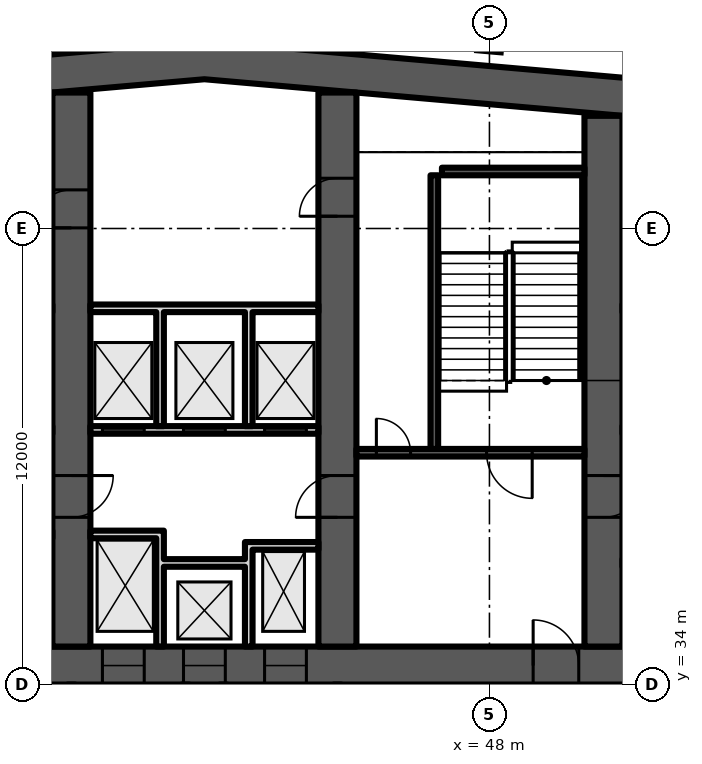
"""IFC4 building model, lengths in metres.
Left out: names, types, materials, properties, quantities, classifications, styles, units other than length and angle.
Written with IfcOpenShell. Run it as: python <this file> out.ifc"""

import sys

from ifc_helpers import new_model, si_unit, direction, frame, frame_2d, origin, origin_2d, place, context, subcontext, project, spatial, polyline, rectangle, i_section, outline, extrude, element, fill, save


model = new_model("IFC4")
c1 = context("Model", 3, precision=1e-05, world=origin(), true_north=direction((0.0, 1.0)))
c2 = subcontext(c1, "Body", "Model", "MODEL_VIEW")
j1 = project(units=[si_unit("LENGTHUNIT", "METRE"), si_unit("PLANEANGLEUNIT", "RADIAN")], contexts=[c1])
p1 = place(None, origin())
s1 = spatial("IfcSite", under=j1, at=p1, CompositionType="ELEMENT")
p2 = place(p1, origin())
s2 = spatial("IfcBuilding", under=s1, at=p2, CompositionType="ELEMENT")
p3 = place(p2, frame((0.0, 0.0, 147.1)))
s3 = spatial("IfcBuildingStorey", under=s2, at=p3, CompositionType="ELEMENT", Elevation=147.1)
p4 = place(p3, frame((0.0, 0.0, -0.0)))
e1 = element("IfcWall", 1, at=p4, inside=s3, PredefinedType="SHEAR", context=c2, shape_type="SweptSolid", body=[
    extrude(outline(polyline([(16.0, 47.784), (40.5, 49.927), (65.0, 47.784), (65.0, 48.787), (40.5, 50.931), (16.0, 48.787), (16.0, 47.784)])), origin(), (0.0, 0.0, 1.0), 4.8),
])
p5 = place(p3, frame((16.0, 34.5, 0.0), z_axis=(0.0, 0.0, 1.0), x_axis=(1.0, 0.0, 0.0)))
e2 = element("IfcWall", 2, at=p5, inside=s3, PredefinedType="SHEAR", context=c2, shape_type="SweptSolid", body=[
    extrude(rectangle(XDim=49.0, YDim=1.0, at=frame_2d((24.5, 0.0))), origin(), (0.0, 0.0, 1.0), 4.8),
])
p6 = place(p5, frame((1.2, 0.0, 0.0)))
e3 = element("IfcOpeningElement", 3, at=p6, cuts=e2, PredefinedType="OPENING", context=c2, shape_type="SweptSolid", body=[
    extrude(rectangle(XDim=1.1, YDim=2.1, at=frame_2d((0.55, 1.05))), frame((0.0, 0.51, 0.0), z_axis=(0.0, -1.0, 0.0), x_axis=(1.0, 0.0, 0.0)), (0.0, 0.0, 1.0), 1.02),
])
p7 = place(p5, frame((5.083, 0.0, 0.0)))
e4 = element("IfcOpeningElement", 4, at=p7, cuts=e2, PredefinedType="OPENING", context=c2, shape_type="SweptSolid", body=[
    extrude(rectangle(XDim=1.1, YDim=2.1, at=frame_2d((0.55, 1.05))), frame((0.0, 0.51, 0.0), z_axis=(0.0, -1.0, 0.0), x_axis=(1.0, 0.0, 0.0)), (0.0, 0.0, 1.0), 1.02),
])
p8 = place(p5, frame((2.933, 0.0, 0.0)))
e5 = element("IfcOpeningElement", 5, at=p8, cuts=e2, PredefinedType="OPENING", context=c2, shape_type="SweptSolid", body=[
    extrude(rectangle(XDim=1.4, YDim=2.1, at=frame_2d((0.7, 1.05))), frame((0.0, 0.51, 0.0), z_axis=(0.0, -1.0, 0.0), x_axis=(1.0, 0.0, 0.0)), (0.0, 0.0, 1.0), 1.02),
])
p9 = place(p5, frame((7.65, 0.0, 0.0)))
e6 = element("IfcOpeningElement", 6, at=p9, cuts=e2, PredefinedType="OPENING", context=c2, shape_type="SweptSolid", body=[
    extrude(rectangle(XDim=1.2, YDim=2.1, at=frame_2d((0.6, 1.05))), frame((0.0, 0.51, 0.0), z_axis=(0.0, -1.0, 0.0), x_axis=(1.0, 0.0, 0.0)), (0.0, 0.0, 1.0), 1.02),
])
p10 = place(p5, frame((14.817, 0.0, 0.0)))
e7 = element("IfcOpeningElement", 7, at=p10, cuts=e2, PredefinedType="OPENING", context=c2, shape_type="SweptSolid", body=[
    extrude(rectangle(XDim=1.1, YDim=2.1, at=frame_2d((0.55, 1.05))), frame((0.0, 0.51, 0.0), z_axis=(0.0, -1.0, 0.0), x_axis=(1.0, 0.0, 0.0)), (0.0, 0.0, 1.0), 1.02),
])
p11 = place(p5, frame((19.083, 0.0, 0.0)))
e8 = element("IfcOpeningElement", 8, at=p11, cuts=e2, PredefinedType="OPENING", context=c2, shape_type="SweptSolid", body=[
    extrude(rectangle(XDim=1.1, YDim=2.1, at=frame_2d((0.55, 1.05))), frame((0.0, 0.51, 0.0), z_axis=(0.0, -1.0, 0.0), x_axis=(1.0, 0.0, 0.0)), (0.0, 0.0, 1.0), 1.02),
])
p12 = place(p5, frame((16.8, 0.0, 0.0)))
e9 = element("IfcOpeningElement", 9, at=p12, cuts=e2, PredefinedType="OPENING", context=c2, shape_type="SweptSolid", body=[
    extrude(rectangle(XDim=1.4, YDim=2.1, at=frame_2d((0.7, 1.05))), frame((0.0, 0.51, 0.0), z_axis=(0.0, -1.0, 0.0), x_axis=(1.0, 0.0, 0.0)), (0.0, 0.0, 1.0), 1.02),
])
p13 = place(p5, frame((21.817, 0.0, 0.0)))
e10 = element("IfcOpeningElement", 10, at=p13, cuts=e2, PredefinedType="OPENING", context=c2, shape_type="SweptSolid", body=[
    extrude(rectangle(XDim=1.1, YDim=2.1, at=frame_2d((0.55, 1.05))), frame((0.0, 0.51, 0.0), z_axis=(0.0, -1.0, 0.0), x_axis=(1.0, 0.0, 0.0)), (0.0, 0.0, 1.0), 1.02),
])
p14 = place(p5, frame((23.95, 0.0, 0.0)))
e11 = element("IfcOpeningElement", 11, at=p14, cuts=e2, PredefinedType="OPENING", context=c2, shape_type="SweptSolid", body=[
    extrude(rectangle(XDim=1.1, YDim=2.1, at=frame_2d((0.55, 1.05))), frame((0.0, 0.51, 0.0), z_axis=(0.0, -1.0, 0.0), x_axis=(1.0, 0.0, 0.0)), (0.0, 0.0, 1.0), 1.02),
])
p15 = place(p5, frame((26.083, 0.0, 0.0)))
e12 = element("IfcOpeningElement", 12, at=p15, cuts=e2, PredefinedType="OPENING", context=c2, shape_type="SweptSolid", body=[
    extrude(rectangle(XDim=1.1, YDim=2.1, at=frame_2d((0.55, 1.05))), frame((0.0, 0.51, 0.0), z_axis=(0.0, -1.0, 0.0), x_axis=(1.0, 0.0, 0.0)), (0.0, 0.0, 1.0), 1.02),
])
p16 = place(p5, frame((33.15, 0.0, 0.0)))
e13 = element("IfcOpeningElement", 13, at=p16, cuts=e2, PredefinedType="OPENING", context=c2, shape_type="SweptSolid", body=[
    extrude(rectangle(XDim=1.2, YDim=2.1, at=frame_2d((0.6, 1.05))), frame((0.0, 0.51, 0.0), z_axis=(0.0, -1.0, 0.0), x_axis=(1.0, 0.0, 0.0)), (0.0, 0.0, 1.0), 1.02),
])
p17 = place(p5, frame((35.817, 0.0, 0.0)))
e14 = element("IfcOpeningElement", 14, at=p17, cuts=e2, PredefinedType="OPENING", context=c2, shape_type="SweptSolid", body=[
    extrude(rectangle(XDim=1.1, YDim=2.1, at=frame_2d((0.55, 1.05))), frame((0.0, 0.51, 0.0), z_axis=(0.0, -1.0, 0.0), x_axis=(1.0, 0.0, 0.0)), (0.0, 0.0, 1.0), 1.02),
])
p18 = place(p5, frame((40.083, 0.0, 0.0)))
e15 = element("IfcOpeningElement", 15, at=p18, cuts=e2, PredefinedType="OPENING", context=c2, shape_type="SweptSolid", body=[
    extrude(rectangle(XDim=1.1, YDim=2.1, at=frame_2d((0.55, 1.05))), frame((0.0, 0.51, 0.0), z_axis=(0.0, -1.0, 0.0), x_axis=(1.0, 0.0, 0.0)), (0.0, 0.0, 1.0), 1.02),
])
p19 = place(p5, frame((37.8, 0.0, 0.0)))
e16 = element("IfcOpeningElement", 16, at=p19, cuts=e2, PredefinedType="OPENING", context=c2, shape_type="SweptSolid", body=[
    extrude(rectangle(XDim=1.4, YDim=2.1, at=frame_2d((0.7, 1.05))), frame((0.0, 0.51, 0.0), z_axis=(0.0, -1.0, 0.0), x_axis=(1.0, 0.0, 0.0)), (0.0, 0.0, 1.0), 1.02),
])
p20 = place(p5, frame((42.817, 0.0, 0.0)))
e17 = element("IfcOpeningElement", 17, at=p20, cuts=e2, PredefinedType="OPENING", context=c2, shape_type="SweptSolid", body=[
    extrude(rectangle(XDim=1.1, YDim=2.1, at=frame_2d((0.55, 1.05))), frame((0.0, 0.51, 0.0), z_axis=(0.0, -1.0, 0.0), x_axis=(1.0, 0.0, 0.0)), (0.0, 0.0, 1.0), 1.02),
])
p21 = place(p5, frame((46.7, 0.0, 0.0)))
e18 = element("IfcOpeningElement", 18, at=p21, cuts=e2, PredefinedType="OPENING", context=c2, shape_type="SweptSolid", body=[
    extrude(rectangle(XDim=1.1, YDim=2.1, at=frame_2d((0.55, 1.05))), frame((0.0, 0.51, 0.0), z_axis=(0.0, -1.0, 0.0), x_axis=(1.0, 0.0, 0.0)), (0.0, 0.0, 1.0), 1.02),
])
p22 = place(p5, frame((44.667, 0.0, 0.0)))
e19 = element("IfcOpeningElement", 19, at=p22, cuts=e2, PredefinedType="OPENING", context=c2, shape_type="SweptSolid", body=[
    extrude(rectangle(XDim=1.4, YDim=2.1, at=frame_2d((0.7, 1.05))), frame((0.0, 0.51, 0.0), z_axis=(0.0, -1.0, 0.0), x_axis=(1.0, 0.0, 0.0)), (0.0, 0.0, 1.0), 1.02),
])
p23 = place(p3, frame((37.0, 35.0, 0.0), z_axis=(0.0, 0.0, 1.0), x_axis=(0.0, 1.0, 0.0)))
e20 = element("IfcWall", 20, at=p23, inside=s3, PredefinedType="SHEAR", context=c2, shape_type="SweptSolid", body=[
    extrude(rectangle(XDim=14.577, YDim=1.0, at=frame_2d((7.289, 0.0))), origin(), (0.0, 0.0, 1.0), 4.8),
])
p24 = place(p23, frame((11.016, 0.0, 0.0)))
e21 = element("IfcOpeningElement", 21, at=p24, cuts=e20, PredefinedType="OPENING", context=c2, shape_type="SweptSolid", body=[
    extrude(rectangle(XDim=1.0, YDim=2.1, at=frame_2d((0.5, 1.05))), frame((0.0, 0.51, 0.0), z_axis=(0.0, -1.0, 0.0), x_axis=(1.0, 0.0, 0.0)), (0.0, 0.0, 1.0), 1.02),
])
p25 = place(p23, frame((3.4, 0.0, 0.0)))
e22 = element("IfcOpeningElement", 22, at=p25, cuts=e20, PredefinedType="OPENING", context=c2, shape_type="SweptSolid", body=[
    extrude(rectangle(XDim=1.1, YDim=2.1, at=frame_2d((0.55, 1.05))), frame((0.0, 0.51, 0.0), z_axis=(0.0, -1.0, 0.0), x_axis=(1.0, 0.0, 0.0)), (0.0, 0.0, 1.0), 1.02),
])
p26 = place(p3, frame((44.0, 35.0, 0.0), z_axis=(0.0, 0.0, 1.0), x_axis=(0.0, 1.0, 0.0)))
e23 = element("IfcWall", 23, at=p26, inside=s3, PredefinedType="SHEAR", context=c2, shape_type="SweptSolid", body=[
    extrude(rectangle(XDim=14.577, YDim=1.0, at=frame_2d((7.289, 0.0))), origin(), (0.0, 0.0, 1.0), 4.8),
])
p27 = place(p26, frame((11.322, 0.0, 0.0)))
e24 = element("IfcOpeningElement", 24, at=p27, cuts=e23, PredefinedType="OPENING", context=c2, shape_type="SweptSolid", body=[
    extrude(rectangle(XDim=1.0, YDim=2.1, at=frame_2d((0.5, 1.05))), frame((0.0, 0.51, 0.0), z_axis=(0.0, -1.0, 0.0), x_axis=(1.0, 0.0, 0.0)), (0.0, 0.0, 1.0), 1.02),
])
p28 = place(p26, frame((3.4, 0.0, 0.0)))
e25 = element("IfcOpeningElement", 25, at=p28, cuts=e23, PredefinedType="OPENING", context=c2, shape_type="SweptSolid", body=[
    extrude(rectangle(XDim=1.1, YDim=2.1, at=frame_2d((0.55, 1.05))), frame((0.0, 0.51, 0.0), z_axis=(0.0, -1.0, 0.0), x_axis=(1.0, 0.0, 0.0)), (0.0, 0.0, 1.0), 1.02),
])
p29 = place(p3, frame((51.0, 35.0, 0.0), z_axis=(0.0, 0.0, 1.0), x_axis=(0.0, 1.0, 0.0)))
e26 = element("IfcWall", 26, at=p29, inside=s3, PredefinedType="SHEAR", context=c2, shape_type="SweptSolid", body=[
    extrude(rectangle(XDim=13.965, YDim=1.0, at=frame_2d((6.982, 0.0))), origin(), (0.0, 0.0, 1.0), 4.8),
])
p30 = place(p29, frame((3.4, 0.0, 0.0)))
e27 = element("IfcOpeningElement", 27, at=p30, cuts=e26, PredefinedType="OPENING", context=c2, shape_type="SweptSolid", body=[
    extrude(rectangle(XDim=1.1, YDim=2.1, at=frame_2d((0.55, 1.05))), frame((0.0, 0.51, 0.0), z_axis=(0.0, -1.0, 0.0), x_axis=(1.0, 0.0, 0.0)), (0.0, 0.0, 1.0), 1.02),
])
p31 = place(p3, frame((48.0, 50.815, 0.0), z_axis=(0.0, 0.0, 1.0), x_axis=(0.087156, 0.996198, 0.0)))
e28 = element("IfcColumn", 28, at=p31, inside=s3, PredefinedType="COLUMN", context=c2, shape_type="SweptSolid", body=[
    extrude(i_section(OverallWidth=0.305, OverallDepth=0.62, WebThickness=0.021, FlangeThickness=0.04, FilletRadius=0.027, at=origin_2d()), origin(), (0.0, 0.0, 1.0), 4.8),
])
p32 = place(p3, frame((37.5, 40.7, 0.0), z_axis=(0.0, 0.0, 1.0), x_axis=(1.0, 0.0, 0.0)))
e29 = element("IfcWall", 29, at=p32, inside=s3, PredefinedType="PARTITIONING", context=c2, shape_type="SweptSolid", body=[
    extrude(rectangle(XDim=6.0, YDim=0.2, at=frame_2d((3.0, 0.0))), origin(), (0.0, 0.0, 1.0), 4.4),
])
p33 = place(p32, frame((0.317, 0.0, 0.0)))
e30 = element("IfcOpeningElement", 30, at=p33, cuts=e29, PredefinedType="OPENING", context=c2, shape_type="SweptSolid", body=[
    extrude(rectangle(XDim=1.1, YDim=2.1, at=frame_2d((0.55, 1.05))), frame((0.0, 0.11, 0.0), z_axis=(0.0, -1.0, 0.0), x_axis=(1.0, 0.0, 0.0)), (0.0, 0.0, 1.0), 0.22),
])
p34 = place(p32, frame((2.45, 0.0, 0.0)))
e31 = element("IfcOpeningElement", 31, at=p34, cuts=e29, PredefinedType="OPENING", context=c2, shape_type="SweptSolid", body=[
    extrude(rectangle(XDim=1.1, YDim=2.1, at=frame_2d((0.55, 1.05))), frame((0.0, 0.11, 0.0), z_axis=(0.0, -1.0, 0.0), x_axis=(1.0, 0.0, 0.0)), (0.0, 0.0, 1.0), 0.22),
])
p35 = place(p32, frame((4.583, 0.0, 0.0)))
e32 = element("IfcOpeningElement", 32, at=p35, cuts=e29, PredefinedType="OPENING", context=c2, shape_type="SweptSolid", body=[
    extrude(rectangle(XDim=1.1, YDim=2.1, at=frame_2d((0.55, 1.05))), frame((0.0, 0.11, 0.0), z_axis=(0.0, -1.0, 0.0), x_axis=(1.0, 0.0, 0.0)), (0.0, 0.0, 1.0), 0.22),
])
p36 = place(p3, frame((0.0, 0.0, -0.0)))
e33 = element("IfcWall", 33, at=p36, inside=s3, PredefinedType="PARTITIONING", context=c2, shape_type="SweptSolid", body=[
    extrude(outline(polyline([(41.567, 37.1), (39.433, 37.1), (39.433, 35.0), (39.233, 35.0), (39.233, 37.85), (37.5, 37.85), (37.5, 38.05), (39.233, 38.05), (39.433, 38.05), (39.433, 37.3), (41.567, 37.3), (41.567, 37.75), (41.767, 37.75), (43.5, 37.75), (43.5, 37.55), (41.767, 37.55), (41.767, 35.0), (41.567, 35.0), (41.567, 37.1)])), origin(), (0.0, 0.0, 1.0), 4.4),
])
p37 = place(p3, frame((0.0, 0.0, -0.0)))
e34 = element("IfcWall", 34, at=p37, inside=s3, PredefinedType="PARTITIONING", context=c2, shape_type="SweptSolid", body=[
    extrude(outline(polyline([(39.433, 40.8), (39.233, 40.8), (39.233, 43.8), (37.5, 43.8), (37.5, 44.0), (43.5, 44.0), (43.5, 43.8), (41.767, 43.8), (41.767, 40.8), (41.567, 40.8), (41.567, 43.8), (39.433, 43.8), (39.433, 40.8)])), origin(), (0.0, 0.0, 1.0), 4.4),
])
p38 = place(p3, frame((44.5, 40.1, 0.0), z_axis=(0.0, 0.0, 1.0), x_axis=(1.0, 0.0, 0.0)))
e35 = element("IfcWall", 35, at=p38, inside=s3, PredefinedType="SHEAR", context=c2, shape_type="SweptSolid", body=[
    extrude(rectangle(XDim=6.0, YDim=0.2, at=frame_2d((3.0, 0.0))), origin(), (0.0, 0.0, 1.0), 4.4),
])
p39 = place(p38, frame((3.425, 0.0, 0.0)))
e36 = element("IfcOpeningElement", 36, at=p39, cuts=e35, PredefinedType="OPENING", context=c2, shape_type="SweptSolid", body=[
    extrude(rectangle(XDim=1.2, YDim=2.1, at=frame_2d((0.6, 1.05))), frame((0.0, 0.11, 0.0), z_axis=(0.0, -1.0, 0.0), x_axis=(1.0, 0.0, 0.0)), (0.0, 0.0, 1.0), 0.22),
])
p40 = place(p38, frame((0.525, 0.0, 0.0)))
e37 = element("IfcOpeningElement", 37, at=p40, cuts=e35, PredefinedType="OPENING", context=c2, shape_type="SweptSolid", body=[
    extrude(rectangle(XDim=0.9, YDim=2.1, at=frame_2d((0.45, 1.05))), frame((0.0, 0.11, 0.0), z_axis=(0.0, -1.0, 0.0), x_axis=(1.0, 0.0, 0.0)), (0.0, 0.0, 1.0), 0.22),
])
p41 = place(p3, frame((46.55, 40.2, 0.0), z_axis=(0.0, 0.0, 1.0), x_axis=(0.0, 1.0, 0.0)))
e38 = element("IfcWall", 38, at=p41, inside=s3, PredefinedType="SHEAR", context=c2, shape_type="SweptSolid", body=[
    extrude(rectangle(XDim=7.2, YDim=0.2, at=frame_2d((3.6, 0.0))), origin(), (0.0, 0.0, 1.0), 4.4),
])
p42 = place(p3, frame((46.75, 47.5, 0.0), z_axis=(0.0, 0.0, 1.0), x_axis=(1.0, 0.0, 0.0)))
e39 = element("IfcWall", 39, at=p42, inside=s3, PredefinedType="SHEAR", context=c2, shape_type="SweptSolid", body=[
    extrude(rectangle(XDim=3.75, YDim=0.2, at=frame_2d((1.875, 0.0))), origin(), (0.0, 0.0, 1.0), 4.4),
])
p43 = place(p24, origin())
e40 = element("IfcDoor", 40, at=p43, inside=s3, OperationType="SINGLE_SWING_LEFT", PredefinedType="DOOR", context=c2, shape_type="SweptSolid", body=[
    extrude(rectangle(XDim=1.0, YDim=2.1, at=frame_2d((0.5, 1.05))), frame((0.0, 0.5, 0.0), z_axis=(0.0, -1.0, 0.0), x_axis=(1.0, 0.0, 0.0)), (0.0, 0.0, 1.0), 1.0),
])
fill(e21, e40)
p44 = place(p13, origin())
e41 = element("IfcDoor", 41, at=p44, inside=s3, OperationType="DOUBLE_DOOR_SLIDING", PredefinedType="DOOR", context=c2, shape_type="SweptSolid", body=[
    extrude(rectangle(XDim=1.1, YDim=2.1, at=frame_2d((0.55, 1.05))), frame((0.0, 0.025, 0.0), z_axis=(0.0, -1.0, 0.0), x_axis=(1.0, 0.0, 0.0)), (0.0, 0.0, 1.0), 0.05),
])
fill(e10, e41)
p45 = place(p14, origin())
e42 = element("IfcDoor", 42, at=p45, inside=s3, OperationType="DOUBLE_DOOR_SLIDING", PredefinedType="DOOR", context=c2, shape_type="SweptSolid", body=[
    extrude(rectangle(XDim=1.1, YDim=2.1, at=frame_2d((0.55, 1.05))), frame((0.0, 0.025, 0.0), z_axis=(0.0, -1.0, 0.0), x_axis=(1.0, 0.0, 0.0)), (0.0, 0.0, 1.0), 0.05),
])
fill(e11, e42)
p46 = place(p15, origin())
e43 = element("IfcDoor", 43, at=p46, inside=s3, OperationType="DOUBLE_DOOR_SLIDING", PredefinedType="DOOR", context=c2, shape_type="SweptSolid", body=[
    extrude(rectangle(XDim=1.1, YDim=2.1, at=frame_2d((0.55, 1.05))), frame((0.0, 0.025, 0.0), z_axis=(0.0, -1.0, 0.0), x_axis=(1.0, 0.0, 0.0)), (0.0, 0.0, 1.0), 0.05),
])
fill(e12, e43)
p47 = place(p33, origin())
e44 = element("IfcDoor", 44, at=p47, inside=s3, OperationType="DOUBLE_DOOR_SLIDING", PredefinedType="DOOR", context=c2, shape_type="SweptSolid", body=[
    extrude(rectangle(XDim=1.1, YDim=2.1, at=frame_2d((0.55, 1.05))), frame((0.0, 0.025, 0.0), z_axis=(0.0, -1.0, 0.0), x_axis=(1.0, 0.0, 0.0)), (0.0, 0.0, 1.0), 0.05),
])
fill(e30, e44)
p48 = place(p34, origin())
e45 = element("IfcDoor", 45, at=p48, inside=s3, OperationType="DOUBLE_DOOR_SLIDING", PredefinedType="DOOR", context=c2, shape_type="SweptSolid", body=[
    extrude(rectangle(XDim=1.1, YDim=2.1, at=frame_2d((0.55, 1.05))), frame((0.0, 0.025, 0.0), z_axis=(0.0, -1.0, 0.0), x_axis=(1.0, 0.0, 0.0)), (0.0, 0.0, 1.0), 0.05),
])
fill(e31, e45)
p49 = place(p35, origin())
e46 = element("IfcDoor", 46, at=p49, inside=s3, OperationType="DOUBLE_DOOR_SLIDING", PredefinedType="DOOR", context=c2, shape_type="SweptSolid", body=[
    extrude(rectangle(XDim=1.1, YDim=2.1, at=frame_2d((0.55, 1.05))), frame((0.0, 0.025, 0.0), z_axis=(0.0, -1.0, 0.0), x_axis=(1.0, 0.0, 0.0)), (0.0, 0.0, 1.0), 0.05),
])
fill(e32, e46)
p50 = place(p27, origin())
e47 = element("IfcDoor", 47, at=p50, inside=s3, OperationType="SINGLE_SWING_LEFT", PredefinedType="DOOR", context=c2, shape_type="SweptSolid", body=[
    extrude(rectangle(XDim=1.0, YDim=2.1, at=frame_2d((0.5, 1.05))), frame((0.0, 0.5, 0.0), z_axis=(0.0, -1.0, 0.0), x_axis=(1.0, 0.0, 0.0)), (0.0, 0.0, 1.0), 1.0),
])
fill(e24, e47)
p51 = place(p39, origin())
e48 = element("IfcDoor", 48, at=p51, inside=s3, OperationType="SINGLE_SWING_RIGHT", PredefinedType="DOOR", context=c2, shape_type="SweptSolid", body=[
    extrude(rectangle(XDim=1.2, YDim=2.1, at=frame_2d((0.6, 1.05))), frame((0.0, 0.025, 0.0), z_axis=(0.0, -1.0, 0.0), x_axis=(1.0, 0.0, 0.0)), (0.0, 0.0, 1.0), 0.05),
])
fill(e36, e48)
p52 = place(p40, origin())
e49 = element("IfcDoor", 49, at=p52, inside=s3, OperationType="SINGLE_SWING_LEFT", PredefinedType="DOOR", context=c2, shape_type="SweptSolid", body=[
    extrude(rectangle(XDim=0.9, YDim=2.1, at=frame_2d((0.45, 1.05))), frame((0.0, 0.025, 0.0), z_axis=(0.0, -1.0, 0.0), x_axis=(1.0, 0.0, 0.0)), (0.0, 0.0, 1.0), 0.05),
])
fill(e37, e49)
p53 = place(p16, origin())
e50 = element("IfcDoor", 50, at=p53, inside=s3, OperationType="SINGLE_SWING_LEFT", PredefinedType="DOOR", context=c2, shape_type="SweptSolid", body=[
    extrude(rectangle(XDim=1.2, YDim=2.1, at=frame_2d((0.6, 1.05))), frame((0.0, 0.025, 0.0), z_axis=(0.0, -1.0, 0.0), x_axis=(1.0, 0.0, 0.0)), (0.0, 0.0, 1.0), 0.05),
])
fill(e13, e50)
p54 = place(p25, origin())
e51 = element("IfcDoor", 51, at=p54, inside=s3, OperationType="SINGLE_SWING_RIGHT", PredefinedType="DOOR", context=c2, shape_type="SweptSolid", body=[
    extrude(rectangle(XDim=1.1, YDim=2.1, at=frame_2d((0.55, 1.05))), frame((0.0, 0.025, 0.0), z_axis=(0.0, -1.0, 0.0), x_axis=(1.0, 0.0, 0.0)), (0.0, 0.0, 1.0), 0.05),
])
fill(e22, e51)
p55 = place(p28, origin())
e52 = element("IfcDoor", 52, at=p55, inside=s3, OperationType="SINGLE_SWING_LEFT", PredefinedType="DOOR", context=c2, shape_type="SweptSolid", body=[
    extrude(rectangle(XDim=1.1, YDim=2.1, at=frame_2d((0.55, 1.05))), frame((0.0, 0.025, 0.0), z_axis=(0.0, -1.0, 0.0), x_axis=(1.0, 0.0, 0.0)), (0.0, 0.0, 1.0), 0.05),
])
fill(e25, e52)
p56 = place(p30, origin())
e53 = element("IfcDoor", 53, at=p56, inside=s3, OperationType="SINGLE_SWING_RIGHT", PredefinedType="DOOR", context=c2, shape_type="SweptSolid", body=[
    extrude(rectangle(XDim=1.1, YDim=2.1, at=frame_2d((0.55, 1.05))), frame((0.0, 0.025, 0.0), z_axis=(0.0, -1.0, 0.0), x_axis=(1.0, 0.0, 0.0)), (0.0, 0.0, 1.0), 0.05),
])
fill(e27, e53)
save(model, sys.argv[1])
